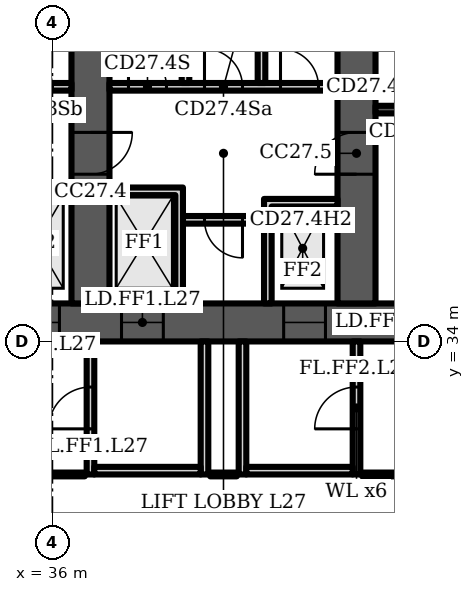
"""IFC4 building model, lengths in metres.
Left out: names, types, materials, properties, quantities, classifications, styles, units other than length and angle.
Written with IfcOpenShell. Run it as: python <this file> out.ifc"""

import sys

from ifc_helpers import new_model, si_unit, direction, frame, frame_2d, origin, place, context, subcontext, project, spatial, polyline, rectangle, outline, extrude, element, fill, save


model = new_model("IFC4")
c1 = context("Model", 3, precision=1e-05, world=origin(), true_north=direction((0.0, 1.0)))
c2 = subcontext(c1, "Body", "Model", "MODEL_VIEW")
j1 = project(units=[si_unit("LENGTHUNIT", "METRE"), si_unit("PLANEANGLEUNIT", "RADIAN")], contexts=[c1])
p1 = place(None, origin())
s1 = spatial("IfcSite", under=j1, at=p1, CompositionType="ELEMENT")
p2 = place(p1, origin())
s2 = spatial("IfcBuilding", under=s1, at=p2, CompositionType="ELEMENT")
p3 = place(p2, frame((0.0, 0.0, 118.3)))
s3 = spatial("IfcBuildingStorey", under=s2, at=p3, CompositionType="ELEMENT", Elevation=118.3)
p4 = place(p3, frame((16.0, 34.5, 0.0), z_axis=(0.0, 0.0, 1.0), x_axis=(1.0, 0.0, 0.0)))
e1 = element("IfcWall", 1, at=p4, inside=s3, PredefinedType="SHEAR", context=c2, shape_type="SweptSolid", body=[
    extrude(rectangle(XDim=49.0, YDim=1.0, at=frame_2d((24.5, 0.0))), origin(), (0.0, 0.0, 1.0), 3.6),
])
p5 = place(p4, frame((1.2, 0.0, 0.0)))
e2 = element("IfcOpeningElement", 2, at=p5, cuts=e1, PredefinedType="OPENING", context=c2, shape_type="SweptSolid", body=[
    extrude(rectangle(XDim=1.1, YDim=2.1, at=frame_2d((0.55, 1.05))), frame((0.0, 0.51, 0.0), z_axis=(0.0, -1.0, 0.0), x_axis=(1.0, 0.0, 0.0)), (0.0, 0.0, 1.0), 1.02),
])
p6 = place(p4, frame((5.083, 0.0, 0.0)))
e3 = element("IfcOpeningElement", 3, at=p6, cuts=e1, PredefinedType="OPENING", context=c2, shape_type="SweptSolid", body=[
    extrude(rectangle(XDim=1.1, YDim=2.1, at=frame_2d((0.55, 1.05))), frame((0.0, 0.51, 0.0), z_axis=(0.0, -1.0, 0.0), x_axis=(1.0, 0.0, 0.0)), (0.0, 0.0, 1.0), 1.02),
])
p7 = place(p4, frame((2.933, 0.0, 0.0)))
e4 = element("IfcOpeningElement", 4, at=p7, cuts=e1, PredefinedType="OPENING", context=c2, shape_type="SweptSolid", body=[
    extrude(rectangle(XDim=1.4, YDim=2.1, at=frame_2d((0.7, 1.05))), frame((0.0, 0.51, 0.0), z_axis=(0.0, -1.0, 0.0), x_axis=(1.0, 0.0, 0.0)), (0.0, 0.0, 1.0), 1.02),
])
p8 = place(p4, frame((7.65, 0.0, 0.0)))
e5 = element("IfcOpeningElement", 5, at=p8, cuts=e1, PredefinedType="OPENING", context=c2, shape_type="SweptSolid", body=[
    extrude(rectangle(XDim=1.2, YDim=2.1, at=frame_2d((0.6, 1.05))), frame((0.0, 0.51, 0.0), z_axis=(0.0, -1.0, 0.0), x_axis=(1.0, 0.0, 0.0)), (0.0, 0.0, 1.0), 1.02),
])
p9 = place(p4, frame((14.817, 0.0, 0.0)))
e6 = element("IfcOpeningElement", 6, at=p9, cuts=e1, PredefinedType="OPENING", context=c2, shape_type="SweptSolid", body=[
    extrude(rectangle(XDim=1.1, YDim=2.1, at=frame_2d((0.55, 1.05))), frame((0.0, 0.51, 0.0), z_axis=(0.0, -1.0, 0.0), x_axis=(1.0, 0.0, 0.0)), (0.0, 0.0, 1.0), 1.02),
])
p10 = place(p4, frame((19.083, 0.0, 0.0)))
e7 = element("IfcOpeningElement", 7, at=p10, cuts=e1, PredefinedType="OPENING", context=c2, shape_type="SweptSolid", body=[
    extrude(rectangle(XDim=1.1, YDim=2.1, at=frame_2d((0.55, 1.05))), frame((0.0, 0.51, 0.0), z_axis=(0.0, -1.0, 0.0), x_axis=(1.0, 0.0, 0.0)), (0.0, 0.0, 1.0), 1.02),
])
p11 = place(p4, frame((16.8, 0.0, 0.0)))
e8 = element("IfcOpeningElement", 8, at=p11, cuts=e1, PredefinedType="OPENING", context=c2, shape_type="SweptSolid", body=[
    extrude(rectangle(XDim=1.4, YDim=2.1, at=frame_2d((0.7, 1.05))), frame((0.0, 0.51, 0.0), z_axis=(0.0, -1.0, 0.0), x_axis=(1.0, 0.0, 0.0)), (0.0, 0.0, 1.0), 1.02),
])
p12 = place(p4, frame((21.817, 0.0, 0.0)))
e9 = element("IfcOpeningElement", 9, at=p12, cuts=e1, PredefinedType="OPENING", context=c2, shape_type="SweptSolid", body=[
    extrude(rectangle(XDim=1.1, YDim=2.1, at=frame_2d((0.55, 1.05))), frame((0.0, 0.51, 0.0), z_axis=(0.0, -1.0, 0.0), x_axis=(1.0, 0.0, 0.0)), (0.0, 0.0, 1.0), 1.02),
])
p13 = place(p4, frame((26.083, 0.0, 0.0)))
e10 = element("IfcOpeningElement", 10, at=p13, cuts=e1, PredefinedType="OPENING", context=c2, shape_type="SweptSolid", body=[
    extrude(rectangle(XDim=1.1, YDim=2.1, at=frame_2d((0.55, 1.05))), frame((0.0, 0.51, 0.0), z_axis=(0.0, -1.0, 0.0), x_axis=(1.0, 0.0, 0.0)), (0.0, 0.0, 1.0), 1.02),
])
p14 = place(p4, frame((33.15, 0.0, 0.0)))
e11 = element("IfcOpeningElement", 11, at=p14, cuts=e1, PredefinedType="OPENING", context=c2, shape_type="SweptSolid", body=[
    extrude(rectangle(XDim=1.2, YDim=2.1, at=frame_2d((0.6, 1.05))), frame((0.0, 0.51, 0.0), z_axis=(0.0, -1.0, 0.0), x_axis=(1.0, 0.0, 0.0)), (0.0, 0.0, 1.0), 1.02),
])
p15 = place(p4, frame((37.8, 0.0, 0.0)))
e12 = element("IfcOpeningElement", 12, at=p15, cuts=e1, PredefinedType="OPENING", context=c2, shape_type="SweptSolid", body=[
    extrude(rectangle(XDim=1.4, YDim=2.1, at=frame_2d((0.7, 1.05))), frame((0.0, 0.51, 0.0), z_axis=(0.0, -1.0, 0.0), x_axis=(1.0, 0.0, 0.0)), (0.0, 0.0, 1.0), 1.02),
])
p16 = place(p4, frame((42.817, 0.0, 0.0)))
e13 = element("IfcOpeningElement", 13, at=p16, cuts=e1, PredefinedType="OPENING", context=c2, shape_type="SweptSolid", body=[
    extrude(rectangle(XDim=1.1, YDim=2.1, at=frame_2d((0.55, 1.05))), frame((0.0, 0.51, 0.0), z_axis=(0.0, -1.0, 0.0), x_axis=(1.0, 0.0, 0.0)), (0.0, 0.0, 1.0), 1.02),
])
p17 = place(p4, frame((46.7, 0.0, 0.0)))
e14 = element("IfcOpeningElement", 14, at=p17, cuts=e1, PredefinedType="OPENING", context=c2, shape_type="SweptSolid", body=[
    extrude(rectangle(XDim=1.1, YDim=2.1, at=frame_2d((0.55, 1.05))), frame((0.0, 0.51, 0.0), z_axis=(0.0, -1.0, 0.0), x_axis=(1.0, 0.0, 0.0)), (0.0, 0.0, 1.0), 1.02),
])
p18 = place(p4, frame((44.667, 0.0, 0.0)))
e15 = element("IfcOpeningElement", 15, at=p18, cuts=e1, PredefinedType="OPENING", context=c2, shape_type="SweptSolid", body=[
    extrude(rectangle(XDim=1.4, YDim=2.1, at=frame_2d((0.7, 1.05))), frame((0.0, 0.51, 0.0), z_axis=(0.0, -1.0, 0.0), x_axis=(1.0, 0.0, 0.0)), (0.0, 0.0, 1.0), 1.02),
])
p19 = place(p3, frame((37.0, 35.0, 0.0), z_axis=(0.0, 0.0, 1.0), x_axis=(0.0, 1.0, 0.0)))
e16 = element("IfcWall", 16, at=p19, inside=s3, PredefinedType="SHEAR", context=c2, shape_type="SweptSolid", body=[
    extrude(rectangle(XDim=14.577, YDim=1.0, at=frame_2d((7.289, 0.0))), origin(), (0.0, 0.0, 1.0), 3.6),
])
p20 = place(p19, frame((3.4, 0.0, 0.0)))
e17 = element("IfcOpeningElement", 17, at=p20, cuts=e16, PredefinedType="OPENING", context=c2, shape_type="SweptSolid", body=[
    extrude(rectangle(XDim=1.1, YDim=2.1, at=frame_2d((0.55, 1.05))), frame((0.0, 0.51, 0.0), z_axis=(0.0, -1.0, 0.0), x_axis=(1.0, 0.0, 0.0)), (0.0, 0.0, 1.0), 1.02),
])
p21 = place(p19, frame((9.8, 0.0, 0.0)))
e18 = element("IfcOpeningElement", 18, at=p21, cuts=e16, PredefinedType="OPENING", context=c2, shape_type="SweptSolid", body=[
    extrude(rectangle(XDim=1.0, YDim=2.1, at=frame_2d((0.5, 1.05))), frame((0.0, 0.51, 0.0), z_axis=(0.0, -1.0, 0.0), x_axis=(1.0, 0.0, 0.0)), (0.0, 0.0, 1.0), 1.02),
])
p22 = place(p3, frame((44.0, 35.0, 0.0), z_axis=(0.0, 0.0, 1.0), x_axis=(0.0, 1.0, 0.0)))
e19 = element("IfcWall", 19, at=p22, inside=s3, PredefinedType="SHEAR", context=c2, shape_type="SweptSolid", body=[
    extrude(rectangle(XDim=14.577, YDim=1.0, at=frame_2d((7.289, 0.0))), origin(), (0.0, 0.0, 1.0), 3.6),
])
p23 = place(p22, frame((3.4, 0.0, 0.0)))
e20 = element("IfcOpeningElement", 20, at=p23, cuts=e19, PredefinedType="OPENING", context=c2, shape_type="SweptSolid", body=[
    extrude(rectangle(XDim=1.1, YDim=2.1, at=frame_2d((0.55, 1.05))), frame((0.0, 0.51, 0.0), z_axis=(0.0, -1.0, 0.0), x_axis=(1.0, 0.0, 0.0)), (0.0, 0.0, 1.0), 1.02),
])
p24 = place(p22, frame((9.8, 0.0, 0.0)))
e21 = element("IfcOpeningElement", 21, at=p24, cuts=e19, PredefinedType="OPENING", context=c2, shape_type="SweptSolid", body=[
    extrude(rectangle(XDim=1.0, YDim=2.1, at=frame_2d((0.5, 1.05))), frame((0.0, 0.51, 0.0), z_axis=(0.0, -1.0, 0.0), x_axis=(1.0, 0.0, 0.0)), (0.0, 0.0, 1.0), 1.02),
])
p25 = place(p3, frame((30.5, 40.7, 0.0), z_axis=(0.0, 0.0, 1.0), x_axis=(1.0, 0.0, 0.0)))
e22 = element("IfcWall", 22, at=p25, inside=s3, PredefinedType="PARTITIONING", context=c2, shape_type="SweptSolid", body=[
    extrude(rectangle(XDim=6.0, YDim=0.2, at=frame_2d((3.0, 0.0))), origin(), (0.0, 0.0, 1.0), 3.2),
])
p26 = place(p25, frame((0.5, 0.0, 0.0)))
e23 = element("IfcOpeningElement", 23, at=p26, cuts=e22, PredefinedType="OPENING", context=c2, shape_type="SweptSolid", body=[
    extrude(rectangle(XDim=1.0, YDim=2.1, at=frame_2d((0.5, 1.05))), frame((0.0, 0.11, 0.0), z_axis=(0.0, -1.0, 0.0), x_axis=(1.0, 0.0, 0.0)), (0.0, 0.0, 1.0), 0.22),
])
p27 = place(p25, frame((2.5, 0.0, 0.0)))
e24 = element("IfcOpeningElement", 24, at=p27, cuts=e22, PredefinedType="OPENING", context=c2, shape_type="SweptSolid", body=[
    extrude(rectangle(XDim=1.0, YDim=2.1, at=frame_2d((0.5, 1.05))), frame((0.0, 0.11, 0.0), z_axis=(0.0, -1.0, 0.0), x_axis=(1.0, 0.0, 0.0)), (0.0, 0.0, 1.0), 0.22),
])
p28 = place(p25, frame((4.5, 0.0, 0.0)))
e25 = element("IfcOpeningElement", 25, at=p28, cuts=e22, PredefinedType="OPENING", context=c2, shape_type="SweptSolid", body=[
    extrude(rectangle(XDim=1.0, YDim=2.1, at=frame_2d((0.5, 1.05))), frame((0.0, 0.11, 0.0), z_axis=(0.0, -1.0, 0.0), x_axis=(1.0, 0.0, 0.0)), (0.0, 0.0, 1.0), 0.22),
])
p29 = place(p3, frame((0.0, 0.0, -0.0)))
e26 = element("IfcWall", 26, at=p29, inside=s3, PredefinedType="PARTITIONING", context=c2, shape_type="SweptSolid", body=[
    extrude(outline(polyline([(34.567, 38.05), (34.767, 38.05), (36.5, 38.05), (36.5, 37.85), (34.767, 37.85), (34.767, 35.0), (34.567, 35.0), (34.567, 38.05)])), origin(), (0.0, 0.0, 1.0), 3.2),
])
p30 = place(p3, frame((39.433, 37.2, 0.0), z_axis=(0.0, 0.0, 1.0), x_axis=(1.0, 0.0, 0.0)))
e27 = element("IfcWall", 27, at=p30, inside=s3, PredefinedType="PARTITIONING", context=c2, shape_type="SweptSolid", body=[
    extrude(rectangle(XDim=2.133, YDim=0.2, at=frame_2d((1.067, 0.0))), origin(), (0.0, 0.0, 1.0), 3.2),
])
p31 = place(p30, frame((0.567, 0.0, 0.0)))
e28 = element("IfcOpeningElement", 28, at=p31, cuts=e27, PredefinedType="OPENING", context=c2, shape_type="SweptSolid", body=[
    extrude(rectangle(XDim=1.0, YDim=2.1, at=frame_2d((0.5, 1.05))), frame((0.0, 0.11, 0.0), z_axis=(0.0, -1.0, 0.0), x_axis=(1.0, 0.0, 0.0)), (0.0, 0.0, 1.0), 0.22),
])
p32 = place(p3, frame((37.5, 40.7, 0.0), z_axis=(0.0, 0.0, 1.0), x_axis=(1.0, 0.0, 0.0)))
e29 = element("IfcWall", 29, at=p32, inside=s3, PredefinedType="PARTITIONING", context=c2, shape_type="SweptSolid", body=[
    extrude(rectangle(XDim=6.0, YDim=0.2, at=frame_2d((3.0, 0.0))), origin(), (0.0, 0.0, 1.0), 3.2),
])
p33 = place(p32, frame((0.5, 0.0, 0.0)))
e30 = element("IfcOpeningElement", 30, at=p33, cuts=e29, PredefinedType="OPENING", context=c2, shape_type="SweptSolid", body=[
    extrude(rectangle(XDim=1.0, YDim=2.1, at=frame_2d((0.5, 1.05))), frame((0.0, 0.11, 0.0), z_axis=(0.0, -1.0, 0.0), x_axis=(1.0, 0.0, 0.0)), (0.0, 0.0, 1.0), 0.22),
])
p34 = place(p32, frame((2.5, 0.0, 0.0)))
e31 = element("IfcOpeningElement", 31, at=p34, cuts=e29, PredefinedType="OPENING", context=c2, shape_type="SweptSolid", body=[
    extrude(rectangle(XDim=1.0, YDim=2.1, at=frame_2d((0.5, 1.05))), frame((0.0, 0.11, 0.0), z_axis=(0.0, -1.0, 0.0), x_axis=(1.0, 0.0, 0.0)), (0.0, 0.0, 1.0), 0.22),
])
p35 = place(p32, frame((4.5, 0.0, 0.0)))
e32 = element("IfcOpeningElement", 32, at=p35, cuts=e29, PredefinedType="OPENING", context=c2, shape_type="SweptSolid", body=[
    extrude(rectangle(XDim=1.0, YDim=2.1, at=frame_2d((0.5, 1.05))), frame((0.0, 0.11, 0.0), z_axis=(0.0, -1.0, 0.0), x_axis=(1.0, 0.0, 0.0)), (0.0, 0.0, 1.0), 0.22),
])
p36 = place(p3, frame((0.0, 0.0, -0.0)))
e33 = element("IfcWall", 33, at=p36, inside=s3, PredefinedType="PARTITIONING", context=c2, shape_type="SweptSolid", body=[
    extrude(outline(polyline([(41.567, 37.75), (41.767, 37.75), (43.5, 37.75), (43.5, 37.55), (41.767, 37.55), (41.767, 35.0), (41.567, 35.0), (41.567, 37.75)])), origin(), (0.0, 0.0, 1.0), 3.2),
])
p37 = place(p3, frame((0.0, 0.0, -0.0)))
e34 = element("IfcWall", 34, at=p37, inside=s3, PredefinedType="PARTITIONING", context=c2, shape_type="SweptSolid", body=[
    extrude(outline(polyline([(39.233, 37.85), (37.5, 37.85), (37.5, 38.05), (39.233, 38.05), (39.433, 38.05), (39.433, 35.0), (39.233, 35.0), (39.233, 37.85)])), origin(), (0.0, 0.0, 1.0), 3.2),
])
for number, where, z_axis, x_axis in (
    (35, (39.5, 40.8, 0.0), (0.0, 0.0, 1.0), (0.0, 1.0, 0.0)),
    (36, (41.5, 40.8, 0.0), (0.0, 0.0, 1.0), (0.0, 1.0, 0.0)),
):
    element("IfcWall", number, at=place(p3, frame(where, z_axis=z_axis, x_axis=x_axis)), inside=s3, PredefinedType="PARTITIONING", context=c2, shape_type="SweptSolid", body=[
        extrude(rectangle(XDim=8.844, YDim=0.2, at=frame_2d((4.422, 0.0))), origin(), (0.0, 0.0, 1.0), 3.2),
    ])
p38 = place(p3, frame((44.5, 40.1, 0.0), z_axis=(0.0, 0.0, 1.0), x_axis=(1.0, 0.0, 0.0)))
e37 = element("IfcWall", 37, at=p38, inside=s3, PredefinedType="SHEAR", context=c2, shape_type="SweptSolid", body=[
    extrude(rectangle(XDim=6.0, YDim=0.2, at=frame_2d((3.0, 0.0))), origin(), (0.0, 0.0, 1.0), 3.2),
])
p39 = place(p38, frame((3.425, 0.0, 0.0)))
e38 = element("IfcOpeningElement", 38, at=p39, cuts=e37, PredefinedType="OPENING", context=c2, shape_type="SweptSolid", body=[
    extrude(rectangle(XDim=1.2, YDim=2.1, at=frame_2d((0.6, 1.05))), frame((0.0, 0.11, 0.0), z_axis=(0.0, -1.0, 0.0), x_axis=(1.0, 0.0, 0.0)), (0.0, 0.0, 1.0), 0.22),
])
p40 = place(p38, frame((0.525, 0.0, 0.0)))
e39 = element("IfcOpeningElement", 39, at=p40, cuts=e37, PredefinedType="OPENING", context=c2, shape_type="SweptSolid", body=[
    extrude(rectangle(XDim=0.9, YDim=2.1, at=frame_2d((0.45, 1.05))), frame((0.0, 0.11, 0.0), z_axis=(0.0, -1.0, 0.0), x_axis=(1.0, 0.0, 0.0)), (0.0, 0.0, 1.0), 0.22),
])
p41 = place(p3, frame((37.0, 30.5, 0.0), z_axis=(0.0, 0.0, 1.0), x_axis=(0.0, 1.0, 0.0)))
e40 = element("IfcWall", 40, at=p41, inside=s3, PredefinedType="PARTITIONING", context=c2, shape_type="SweptSolid", body=[
    extrude(rectangle(XDim=3.5, YDim=0.2, at=frame_2d((1.75, 0.0))), origin(), (0.0, 0.0, 1.0), 3.2),
])
p42 = place(p41, frame((1.2, 0.0, 0.0)))
e41 = element("IfcOpeningElement", 41, at=p42, cuts=e40, PredefinedType="OPENING", context=c2, shape_type="SweptSolid", body=[
    extrude(rectangle(XDim=1.1, YDim=2.1, at=frame_2d((0.55, 1.05))), frame((0.0, 0.11, 0.0), z_axis=(0.0, -1.0, 0.0), x_axis=(1.0, 0.0, 0.0)), (0.0, 0.0, 1.0), 0.22),
])
p43 = place(p3, frame((40.0, 30.5, 0.0), z_axis=(0.0, 0.0, 1.0), x_axis=(0.0, 1.0, 0.0)))
e42 = element("IfcWall", 42, at=p43, inside=s3, PredefinedType="PARTITIONING", context=c2, shape_type="SweptSolid", body=[
    extrude(rectangle(XDim=3.5, YDim=0.2, at=frame_2d((1.75, 0.0))), origin(), (0.0, 0.0, 1.0), 3.2),
])
p44 = place(p3, frame((37.1, 30.6, 0.0), z_axis=(0.0, 0.0, 1.0), x_axis=(1.0, 0.0, 0.0)))
e43 = element("IfcWall", 43, at=p44, inside=s3, PredefinedType="PARTITIONING", context=c2, shape_type="SweptSolid", body=[
    extrude(rectangle(XDim=2.8, YDim=0.2, at=frame_2d((1.4, 0.0))), origin(), (0.0, 0.0, 1.0), 3.2),
])
p45 = place(p3, frame((41.0, 30.5, 0.0), z_axis=(0.0, 0.0, 1.0), x_axis=(0.0, 1.0, 0.0)))
e44 = element("IfcWall", 44, at=p45, inside=s3, PredefinedType="PARTITIONING", context=c2, shape_type="SweptSolid", body=[
    extrude(rectangle(XDim=3.5, YDim=0.2, at=frame_2d((1.75, 0.0))), origin(), (0.0, 0.0, 1.0), 3.2),
])
p46 = place(p3, frame((44.0, 30.5, 0.0), z_axis=(0.0, 0.0, 1.0), x_axis=(0.0, 1.0, 0.0)))
e45 = element("IfcWall", 45, at=p46, inside=s3, PredefinedType="PARTITIONING", context=c2, shape_type="SweptSolid", body=[
    extrude(rectangle(XDim=3.5, YDim=0.2, at=frame_2d((1.75, 0.0))), origin(), (0.0, 0.0, 1.0), 3.2),
])
p47 = place(p46, frame((1.2, 0.0, 0.0)))
e46 = element("IfcOpeningElement", 46, at=p47, cuts=e45, PredefinedType="OPENING", context=c2, shape_type="SweptSolid", body=[
    extrude(rectangle(XDim=1.1, YDim=2.1, at=frame_2d((0.55, 1.05))), frame((0.0, 0.11, 0.0), z_axis=(0.0, -1.0, 0.0), x_axis=(1.0, 0.0, 0.0)), (0.0, 0.0, 1.0), 0.22),
])
p48 = place(p3, frame((41.1, 30.6, 0.0), z_axis=(0.0, 0.0, 1.0), x_axis=(1.0, 0.0, 0.0)))
e47 = element("IfcWall", 47, at=p48, inside=s3, PredefinedType="PARTITIONING", context=c2, shape_type="SweptSolid", body=[
    extrude(rectangle(XDim=2.8, YDim=0.2, at=frame_2d((1.4, 0.0))), origin(), (0.0, 0.0, 1.0), 3.2),
])
p49 = place(p3, frame((33.4, 30.5, 0.0), z_axis=(0.0, 0.0, 1.0), x_axis=(1.0, 0.0, 0.0)))
e48 = element("IfcWall", 48, at=p49, inside=s3, PredefinedType="PARTITIONING", context=c2, shape_type="SweptSolid", body=[
    extrude(rectangle(XDim=3.45, YDim=0.1, at=frame_2d((1.725, 0.0))), origin(), (0.0, 0.0, 1.0), 3.2),
])
p50 = place(p3, frame((40.15, 30.5, 0.0), z_axis=(0.0, 0.0, 1.0), x_axis=(1.0, 0.0, 0.0)))
e49 = element("IfcWall", 49, at=p50, inside=s3, PredefinedType="PARTITIONING", context=c2, shape_type="SweptSolid", body=[
    extrude(rectangle(XDim=0.7, YDim=0.1, at=frame_2d((0.35, 0.0))), origin(), (0.0, 0.0, 1.0), 3.2),
])
p51 = place(p3, frame((44.15, 30.5, 0.0), z_axis=(0.0, 0.0, 1.0), x_axis=(1.0, 0.0, 0.0)))
e50 = element("IfcWall", 50, at=p51, inside=s3, PredefinedType="PARTITIONING", context=c2, shape_type="SweptSolid", body=[
    extrude(rectangle(XDim=13.45, YDim=0.1, at=frame_2d((6.725, 0.0))), origin(), (0.0, 0.0, 1.0), 3.2),
])
p52 = place(p10, origin())
e51 = element("IfcDoor", 51, at=p52, inside=s3, OperationType="DOUBLE_DOOR_SLIDING", PredefinedType="DOOR", context=c2, shape_type="SweptSolid", body=[
    extrude(rectangle(XDim=1.1, YDim=2.1, at=frame_2d((0.55, 1.05))), frame((0.0, 0.025, 0.0), z_axis=(0.0, -1.0, 0.0), x_axis=(1.0, 0.0, 0.0)), (0.0, 0.0, 1.0), 0.05),
])
fill(e7, e51)
p53 = place(p31, origin())
e52 = element("IfcDoor", 52, at=p53, inside=s3, OperationType="SINGLE_SWING_RIGHT", PredefinedType="DOOR", context=c2, shape_type="SweptSolid", body=[
    extrude(rectangle(XDim=1.0, YDim=2.1, at=frame_2d((0.5, 1.05))), frame((0.0, 0.025, 0.0), z_axis=(0.0, -1.0, 0.0), x_axis=(1.0, 0.0, 0.0)), (0.0, 0.0, 1.0), 0.05),
])
fill(e28, e52)
p54 = place(p12, origin())
e53 = element("IfcDoor", 53, at=p54, inside=s3, OperationType="DOUBLE_DOOR_SLIDING", PredefinedType="DOOR", context=c2, shape_type="SweptSolid", body=[
    extrude(rectangle(XDim=1.1, YDim=2.1, at=frame_2d((0.55, 1.05))), frame((0.0, 0.025, 0.0), z_axis=(0.0, -1.0, 0.0), x_axis=(1.0, 0.0, 0.0)), (0.0, 0.0, 1.0), 0.05),
])
fill(e9, e53)
p55 = place(p13, origin())
e54 = element("IfcDoor", 54, at=p55, inside=s3, OperationType="DOUBLE_DOOR_SLIDING", PredefinedType="DOOR", context=c2, shape_type="SweptSolid", body=[
    extrude(rectangle(XDim=1.1, YDim=2.1, at=frame_2d((0.55, 1.05))), frame((0.0, 0.025, 0.0), z_axis=(0.0, -1.0, 0.0), x_axis=(1.0, 0.0, 0.0)), (0.0, 0.0, 1.0), 0.05),
])
fill(e10, e54)
p56 = place(p33, origin())
e55 = element("IfcDoor", 55, at=p56, inside=s3, OperationType="SINGLE_SWING_LEFT", PredefinedType="DOOR", context=c2, shape_type="SweptSolid", body=[
    extrude(rectangle(XDim=1.0, YDim=2.1, at=frame_2d((0.5, 1.05))), frame((0.0, 0.025, 0.0), z_axis=(0.0, -1.0, 0.0), x_axis=(1.0, 0.0, 0.0)), (0.0, 0.0, 1.0), 0.05),
])
fill(e30, e55)
p57 = place(p34, origin())
e56 = element("IfcDoor", 56, at=p57, inside=s3, OperationType="SINGLE_SWING_LEFT", PredefinedType="DOOR", context=c2, shape_type="SweptSolid", body=[
    extrude(rectangle(XDim=1.0, YDim=2.1, at=frame_2d((0.5, 1.05))), frame((0.0, 0.025, 0.0), z_axis=(0.0, -1.0, 0.0), x_axis=(1.0, 0.0, 0.0)), (0.0, 0.0, 1.0), 0.05),
])
fill(e31, e56)
p58 = place(p35, origin())
e57 = element("IfcDoor", 57, at=p58, inside=s3, OperationType="SINGLE_SWING_LEFT", PredefinedType="DOOR", context=c2, shape_type="SweptSolid", body=[
    extrude(rectangle(XDim=1.0, YDim=2.1, at=frame_2d((0.5, 1.05))), frame((0.0, 0.025, 0.0), z_axis=(0.0, -1.0, 0.0), x_axis=(1.0, 0.0, 0.0)), (0.0, 0.0, 1.0), 0.05),
])
fill(e32, e57)
p59 = place(p20, origin())
e58 = element("IfcDoor", 58, at=p59, inside=s3, OperationType="SINGLE_SWING_RIGHT", PredefinedType="DOOR", context=c2, shape_type="SweptSolid", body=[
    extrude(rectangle(XDim=1.1, YDim=2.1, at=frame_2d((0.55, 1.05))), frame((0.0, 0.025, 0.0), z_axis=(0.0, -1.0, 0.0), x_axis=(1.0, 0.0, 0.0)), (0.0, 0.0, 1.0), 0.05),
])
fill(e17, e58)
p60 = place(p23, origin())
e59 = element("IfcDoor", 59, at=p60, inside=s3, OperationType="SINGLE_SWING_LEFT", PredefinedType="DOOR", context=c2, shape_type="SweptSolid", body=[
    extrude(rectangle(XDim=1.1, YDim=2.1, at=frame_2d((0.55, 1.05))), frame((0.0, 0.025, 0.0), z_axis=(0.0, -1.0, 0.0), x_axis=(1.0, 0.0, 0.0)), (0.0, 0.0, 1.0), 0.05),
])
fill(e20, e59)
p61 = place(p42, origin())
e60 = element("IfcDoor", 60, at=p61, inside=s3, OperationType="SINGLE_SWING_LEFT", PredefinedType="DOOR", context=c2, shape_type="SweptSolid", body=[
    extrude(rectangle(XDim=1.1, YDim=2.1, at=frame_2d((0.55, 1.05))), frame((0.0, 0.025, 0.0), z_axis=(0.0, -1.0, 0.0), x_axis=(1.0, 0.0, 0.0)), (0.0, 0.0, 1.0), 0.05),
])
fill(e41, e60)
p62 = place(p47, origin())
e61 = element("IfcDoor", 61, at=p62, inside=s3, OperationType="SINGLE_SWING_LEFT", PredefinedType="DOOR", context=c2, shape_type="SweptSolid", body=[
    extrude(rectangle(XDim=1.1, YDim=2.1, at=frame_2d((0.55, 1.05))), frame((0.0, 0.025, 0.0), z_axis=(0.0, -1.0, 0.0), x_axis=(1.0, 0.0, 0.0)), (0.0, 0.0, 1.0), 0.05),
])
fill(e46, e61)
save(model, sys.argv[1])
